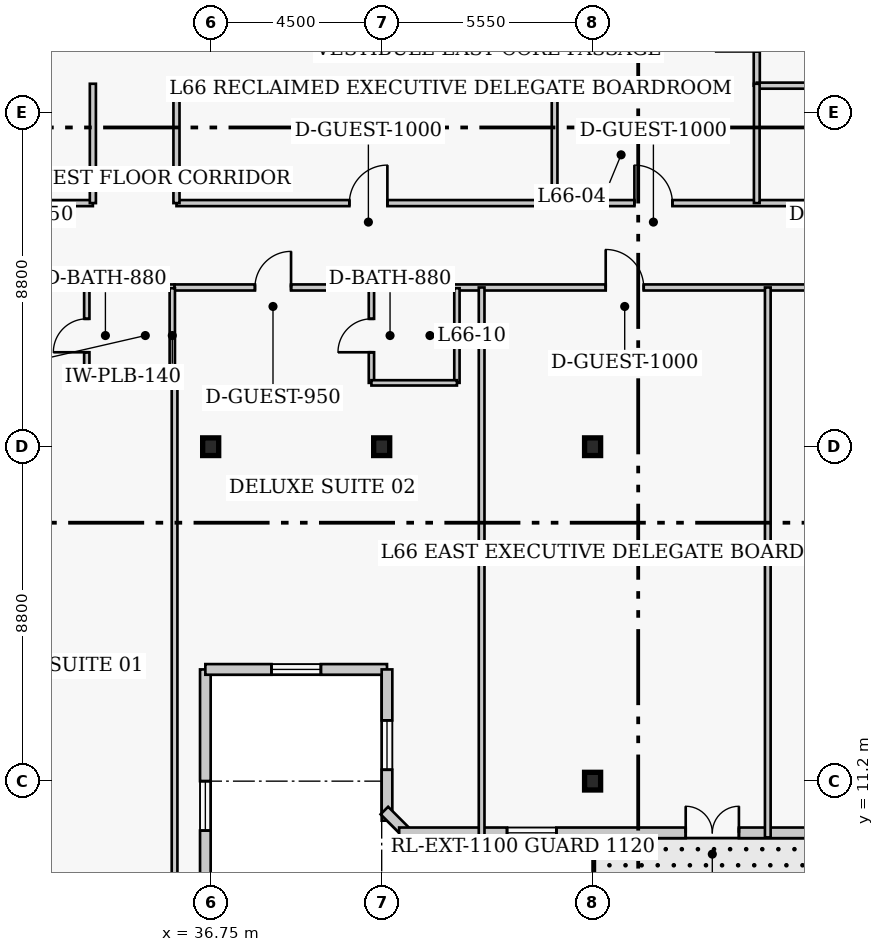
"""IFC4 building model, lengths in metres.
Left out: names, types, materials, properties, quantities, classifications, styles, units other than length and angle.
Written with IfcOpenShell. Run it as: python <this file> out.ifc"""

import sys

from ifc_helpers import new_model, si_unit, direction, frame, frame_2d, origin, origin_2d, place, context, subcontext, project, spatial, rectangle, i_section, extrude, element, fill, save


model = new_model("IFC4")
c1 = context("Model", 3, precision=1e-05, world=origin(), true_north=direction((0.0, 1.0)))
c2 = subcontext(c1, "Body", "Model", "MODEL_VIEW")
j1 = project(units=[si_unit("LENGTHUNIT", "METRE"), si_unit("PLANEANGLEUNIT", "RADIAN")], contexts=[c1])
p1 = place(None, origin())
s1 = spatial("IfcSite", under=j1, at=p1, CompositionType="ELEMENT")
p2 = place(p1, origin())
s2 = spatial("IfcBuilding", under=s1, at=p2, CompositionType="ELEMENT")
p3 = place(p2, frame((0.0, 0.0, 265.4)))
s3 = spatial("IfcBuildingStorey", under=s2, at=p3, CompositionType="ELEMENT", Elevation=265.4)
for number, where, z_axis, x_axis in (
    (1, (36.75, 20.0, 0.0), (0.0, 0.0, 1.0), (1.0, 0.0, 0.0)),
    (2, (41.25, 20.0, 0.0), (0.0, 0.0, 1.0), (1.0, 0.0, 0.0)),
    (3, (46.8, 11.2, 0.0), (0.0, 0.0, 1.0), (1.0, 0.0, 0.0)),
    (4, (46.8, 20.0, 0.0), (0.0, 0.0, 1.0), (1.0, 0.0, 0.0)),
):
    element("IfcColumn", number, at=place(p3, frame(where, z_axis=z_axis, x_axis=x_axis)), inside=s3, PredefinedType="COLUMN", context=c2, shape_type="SweptSolid", body=[
        extrude(i_section(OverallWidth=0.422, OverallDepth=0.465, WebThickness=0.045, FlangeThickness=0.073, FilletRadius=0.017, at=origin_2d()), origin(), (0.0, 0.0, 1.0), 4.0),
    ])
p4 = place(p3, frame((36.61, 6.96, 0.0), z_axis=(0.0, 0.0, 1.0), x_axis=(0.0, 1.0, 0.0)))
e5 = element("IfcWall", 5, at=p4, inside=s3, PredefinedType="SOLIDWALL", context=c2, shape_type="SweptSolid", body=[
    extrude(rectangle(XDim=7.18, YDim=0.28, at=frame_2d((3.59, 0.0))), origin(), (0.0, 0.0, 1.0), 3.76),
])
p5 = place(p4, frame((2.94, 0.0, 0.85)))
e6 = element("IfcOpeningElement", 6, at=p5, cuts=e5, PredefinedType="OPENING", context=c2, shape_type="SweptSolid", body=[
    extrude(rectangle(XDim=1.3, YDim=1.7, at=frame_2d((0.65, 0.85))), frame((0.0, 0.15, 0.0), z_axis=(0.0, -1.0, 0.0), x_axis=(1.0, 0.0, 0.0)), (0.0, 0.0, 1.0), 0.3),
])
p6 = place(p3, frame((36.61, 14.14, 0.0), z_axis=(0.0, 0.0, 1.0), x_axis=(1.0, 0.0, 0.0)))
e7 = element("IfcWall", 7, at=p6, inside=s3, PredefinedType="SOLIDWALL", context=c2, shape_type="SweptSolid", body=[
    extrude(rectangle(XDim=4.78, YDim=0.28, at=frame_2d((2.39, 0.0))), origin(), (0.0, 0.0, 1.0), 3.76),
])
p7 = place(p6, frame((1.74, 0.0, 0.85)))
e8 = element("IfcOpeningElement", 8, at=p7, cuts=e7, PredefinedType="OPENING", context=c2, shape_type="SweptSolid", body=[
    extrude(rectangle(XDim=1.3, YDim=1.7, at=frame_2d((0.65, 0.85))), frame((0.0, 0.15, 0.0), z_axis=(0.0, -1.0, 0.0), x_axis=(1.0, 0.0, 0.0)), (0.0, 0.0, 1.0), 0.3),
])
p8 = place(p3, frame((41.39, 14.14, 0.0), z_axis=(0.0, 0.0, 1.0), x_axis=(0.0, -1.0, 0.0)))
e9 = element("IfcWall", 9, at=p8, inside=s3, PredefinedType="SOLIDWALL", context=c2, shape_type="SweptSolid", body=[
    extrude(rectangle(XDim=3.98, YDim=0.28, at=frame_2d((1.99, 0.0))), origin(), (0.0, 0.0, 1.0), 3.76),
])
p9 = place(p8, frame((1.34, 0.0, 0.85)))
e10 = element("IfcOpeningElement", 10, at=p9, cuts=e9, PredefinedType="OPENING", context=c2, shape_type="SweptSolid", body=[
    extrude(rectangle(XDim=1.3, YDim=1.7, at=frame_2d((0.65, 0.85))), frame((0.0, 0.15, 0.0), z_axis=(0.0, -1.0, 0.0), x_axis=(1.0, 0.0, 0.0)), (0.0, 0.0, 1.0), 0.3),
])
p10 = place(p3, frame((41.321, 10.427, 0.0), z_axis=(0.0, 0.0, 1.0), x_axis=(0.707106781187, -0.707106781187, 0.0)))
e11 = element("IfcWall", 11, at=p10, inside=s3, PredefinedType="SOLIDWALL", context=c2, shape_type="SweptSolid", body=[
    extrude(rectangle(XDim=0.928, YDim=0.28, at=frame_2d((0.464, 0.0))), origin(), (0.0, 0.0, 1.0), 3.76),
])
p11 = place(p3, frame((41.71, 9.84, 0.0), z_axis=(0.0, 0.0, 1.0), x_axis=(1.0, 0.0, 0.0)))
e12 = element("IfcWall", 12, at=p11, inside=s3, PredefinedType="SOLIDWALL", context=c2, shape_type="SweptSolid", body=[
    extrude(rectangle(XDim=24.83, YDim=0.28, at=frame_2d((12.415, 0.0))), origin(), (0.0, 0.0, 1.0), 3.76),
])
p12 = place(p11, frame((7.54, 0.0, 0.0)))
e13 = element("IfcOpeningElement", 13, at=p12, cuts=e12, PredefinedType="OPENING", context=c2, shape_type="SweptSolid", body=[
    extrude(rectangle(XDim=1.4, YDim=2.15, at=frame_2d((0.7, 1.075))), frame((0.0, 0.15, 0.0), z_axis=(0.0, -1.0, 0.0), x_axis=(1.0, 0.0, 0.0)), (0.0, 0.0, 1.0), 0.3),
])
p13 = place(p11, frame((2.838, 0.0, 0.85)))
e14 = element("IfcOpeningElement", 14, at=p13, cuts=e12, PredefinedType="OPENING", context=c2, shape_type="SweptSolid", body=[
    extrude(rectangle(XDim=1.3, YDim=1.7, at=frame_2d((0.65, 0.85))), frame((0.0, 0.15, 0.0), z_axis=(0.0, -1.0, 0.0), x_axis=(1.0, 0.0, 0.0)), (0.0, 0.0, 1.0), 0.3),
])
p14 = place(p11, frame((11.115, 0.0, 0.85)))
e15 = element("IfcOpeningElement", 15, at=p14, cuts=e12, PredefinedType="OPENING", context=c2, shape_type="SweptSolid", body=[
    extrude(rectangle(XDim=1.3, YDim=1.7, at=frame_2d((0.65, 0.85))), frame((0.0, 0.15, 0.0), z_axis=(0.0, -1.0, 0.0), x_axis=(1.0, 0.0, 0.0)), (0.0, 0.0, 1.0), 0.3),
])
p15 = place(p11, frame((18.892, 0.0, 0.85)))
e16 = element("IfcOpeningElement", 16, at=p15, cuts=e12, PredefinedType="OPENING", context=c2, shape_type="SweptSolid", body=[
    extrude(rectangle(XDim=1.3, YDim=1.7, at=frame_2d((0.65, 0.85))), frame((0.0, 0.15, 0.0), z_axis=(0.0, -1.0, 0.0), x_axis=(1.0, 0.0, 0.0)), (0.0, 0.0, 1.0), 0.3),
])
p16 = place(p3, frame((51.12, 29.5, 0.0), z_axis=(0.0, 0.0, 1.0), x_axis=(0.0, 1.0, 0.0)))
e17 = element("IfcWall", 17, at=p16, inside=s3, PredefinedType="PARTITIONING", context=c2, shape_type="SweptSolid", body=[
    extrude(rectangle(XDim=3.7, YDim=0.16, at=frame_2d((1.85, 0.0))), origin(), (0.0, 0.0, 1.0), 3.76),
])
p17 = place(p16, frame((0.9, 0.0, 0.0)))
e18 = element("IfcOpeningElement", 18, at=p17, cuts=e17, PredefinedType="OPENING", context=c2, shape_type="SweptSolid", body=[
    extrude(rectangle(XDim=1.1, YDim=2.15, at=frame_2d((0.55, 1.075))), frame((0.0, 0.09, 0.0), z_axis=(0.0, -1.0, 0.0), x_axis=(1.0, 0.0, 0.0)), (0.0, 0.0, 1.0), 0.18),
])
p18 = place(p3, frame((51.12, 29.5, 0.0), z_axis=(0.0, 0.0, 1.0), x_axis=(1.0, 0.0, 0.0)))
e19 = element("IfcWall", 19, at=p18, inside=s3, PredefinedType="PARTITIONING", context=c2, shape_type="SweptSolid", body=[
    extrude(rectangle(XDim=5.63, YDim=0.16, at=frame_2d((2.815, 0.0))), origin(), (0.0, 0.0, 1.0), 3.76),
])
p19 = place(p3, frame((20.4, 26.41, 0.0), z_axis=(0.0, 0.0, 1.0), x_axis=(1.0, 0.0, 0.0)))
e20 = element("IfcWall", 20, at=p19, inside=s3, PredefinedType="PARTITIONING", context=c2, shape_type="SweptSolid", body=[
    extrude(rectangle(XDim=13.25, YDim=0.16, at=frame_2d((6.625, 0.0))), origin(), (0.0, 0.0, 1.0), 3.76),
])
p20 = place(p19, frame((6.25, 0.0, 0.0)))
e21 = element("IfcOpeningElement", 21, at=p20, cuts=e20, PredefinedType="OPENING", context=c2, shape_type="SweptSolid", body=[
    extrude(rectangle(XDim=1.0, YDim=2.15, at=frame_2d((0.5, 1.075))), frame((0.0, 0.09, 0.0), z_axis=(0.0, -1.0, 0.0), x_axis=(1.0, 0.0, 0.0)), (0.0, 0.0, 1.0), 0.18),
])
p21 = place(p3, frame((35.85, 26.41, 0.0), z_axis=(0.0, 0.0, 1.0), x_axis=(1.0, 0.0, 0.0)))
e22 = element("IfcWall", 22, at=p21, inside=s3, PredefinedType="PARTITIONING", context=c2, shape_type="SweptSolid", body=[
    extrude(rectangle(XDim=22.6, YDim=0.16, at=frame_2d((11.3, 0.0))), origin(), (0.0, 0.0, 1.0), 3.76),
])
p22 = place(p21, frame((4.55, 0.0, 0.0)))
e23 = element("IfcOpeningElement", 23, at=p22, cuts=e22, PredefinedType="OPENING", context=c2, shape_type="SweptSolid", body=[
    extrude(rectangle(XDim=1.0, YDim=2.15, at=frame_2d((0.5, 1.075))), frame((0.0, 0.09, 0.0), z_axis=(0.0, -1.0, 0.0), x_axis=(1.0, 0.0, 0.0)), (0.0, 0.0, 1.0), 0.18),
])
p23 = place(p21, frame((12.05, 0.0, 0.0)))
e24 = element("IfcOpeningElement", 24, at=p23, cuts=e22, PredefinedType="OPENING", context=c2, shape_type="SweptSolid", body=[
    extrude(rectangle(XDim=1.0, YDim=2.15, at=frame_2d((0.5, 1.075))), frame((0.0, 0.09, 0.0), z_axis=(0.0, -1.0, 0.0), x_axis=(1.0, 0.0, 0.0)), (0.0, 0.0, 1.0), 0.18),
])
for number, where, z_axis, x_axis in (
    (25, (33.65, 26.41, 0.0), (0.0, 0.0, 1.0), (0.0, 1.0, 0.0)),
    (26, (35.85, 26.41, 0.0), (0.0, 0.0, 1.0), (0.0, 1.0, 0.0)),
):
    element("IfcWall", number, at=place(p3, frame(where, z_axis=z_axis, x_axis=x_axis)), inside=s3, PredefinedType="PARTITIONING", context=c2, shape_type="SweptSolid", body=[
        extrude(rectangle(XDim=3.14, YDim=0.16, at=frame_2d((1.57, 0.0))), origin(), (0.0, 0.0, 1.0), 3.76),
    ])
p24 = place(p3, frame((20.4, 24.19, 0.0), z_axis=(0.0, 0.0, 1.0), x_axis=(1.0, 0.0, 0.0)))
e27 = element("IfcWall", 27, at=p24, inside=s3, PredefinedType="PARTITIONING", context=c2, shape_type="SweptSolid", body=[
    extrude(rectangle(XDim=15.4, YDim=0.16, at=frame_2d((7.7, 0.0))), origin(), (0.0, 0.0, 1.0), 3.76),
])
p25 = place(p24, frame((3.945, 0.0, 0.0)))
e28 = element("IfcOpeningElement", 28, at=p25, cuts=e27, PredefinedType="OPENING", context=c2, shape_type="SweptSolid", body=[
    extrude(rectangle(XDim=1.0, YDim=2.15, at=frame_2d((0.5, 1.075))), frame((0.0, 0.09, 0.0), z_axis=(0.0, -1.0, 0.0), x_axis=(1.0, 0.0, 0.0)), (0.0, 0.0, 1.0), 0.18),
])
p26 = place(p24, frame((10.485, 0.0, 0.0)))
e29 = element("IfcOpeningElement", 29, at=p26, cuts=e27, PredefinedType="OPENING", context=c2, shape_type="SweptSolid", body=[
    extrude(rectangle(XDim=0.95, YDim=2.1, at=frame_2d((0.475, 1.05))), frame((0.0, 0.09, 0.0), z_axis=(0.0, -1.0, 0.0), x_axis=(1.0, 0.0, 0.0)), (0.0, 0.0, 1.0), 0.18),
])
p27 = place(p3, frame((35.8, 24.19, 0.0), z_axis=(0.0, 0.0, 1.0), x_axis=(1.0, 0.0, 0.0)))
e30 = element("IfcWall", 30, at=p27, inside=s3, PredefinedType="PARTITIONING", context=c2, shape_type="SweptSolid", body=[
    extrude(rectangle(XDim=24.81, YDim=0.16, at=frame_2d((12.405, 0.0))), origin(), (0.0, 0.0, 1.0), 3.76),
])
p28 = place(p27, frame((2.115, 0.0, 0.0)))
e31 = element("IfcOpeningElement", 31, at=p28, cuts=e30, PredefinedType="OPENING", context=c2, shape_type="SweptSolid", body=[
    extrude(rectangle(XDim=0.95, YDim=2.1, at=frame_2d((0.475, 1.05))), frame((0.0, 0.09, 0.0), z_axis=(0.0, -1.0, 0.0), x_axis=(1.0, 0.0, 0.0)), (0.0, 0.0, 1.0), 0.18),
])
p29 = place(p27, frame((11.345, 0.0, 0.0)))
e32 = element("IfcOpeningElement", 32, at=p29, cuts=e30, PredefinedType="OPENING", context=c2, shape_type="SweptSolid", body=[
    extrude(rectangle(XDim=1.0, YDim=2.15, at=frame_2d((0.5, 1.075))), frame((0.0, 0.09, 0.0), z_axis=(0.0, -1.0, 0.0), x_axis=(1.0, 0.0, 0.0)), (0.0, 0.0, 1.0), 0.18),
])
p30 = place(p27, frame((17.47, 0.0, 0.0)))
e33 = element("IfcOpeningElement", 33, at=p30, cuts=e30, PredefinedType="OPENING", context=c2, shape_type="SweptSolid", body=[
    extrude(rectangle(XDim=0.95, YDim=2.1, at=frame_2d((0.475, 1.05))), frame((0.0, 0.09, 0.0), z_axis=(0.0, -1.0, 0.0), x_axis=(1.0, 0.0, 0.0)), (0.0, 0.0, 1.0), 0.18),
])
p31 = place(p27, frame((23.265, 0.0, 0.0)))
e34 = element("IfcOpeningElement", 34, at=p31, cuts=e30, PredefinedType="OPENING", context=c2, shape_type="SweptSolid", body=[
    extrude(rectangle(XDim=0.95, YDim=2.1, at=frame_2d((0.475, 1.05))), frame((0.0, 0.09, 0.0), z_axis=(0.0, -1.0, 0.0), x_axis=(1.0, 0.0, 0.0)), (0.0, 0.0, 1.0), 0.18),
])
for number, where, z_axis, x_axis in (
    (35, (45.8, 26.41, 0.0), (0.0, 0.0, 1.0), (0.0, 1.0, 0.0)),
    (36, (51.12, 26.41, 0.0), (0.0, 0.0, 1.0), (0.0, 1.0, 0.0)),
):
    element("IfcWall", number, at=place(p3, frame(where, z_axis=z_axis, x_axis=x_axis)), inside=s3, PredefinedType="PARTITIONING", context=c2, shape_type="SweptSolid", body=[
        extrude(rectangle(XDim=3.14, YDim=0.15, at=frame_2d((1.57, 0.0))), origin(), (0.0, 0.0, 1.0), 3.76),
    ])
p32 = place(p3, frame((33.49, 21.68, 0.0), z_axis=(0.0, 0.0, 1.0), x_axis=(0.0, 1.0, 0.0)))
e37 = element("IfcWall", 37, at=p32, inside=s3, PredefinedType="PLUMBINGWALL", context=c2, shape_type="SweptSolid", body=[
    extrude(rectangle(XDim=2.49, YDim=0.14, at=frame_2d((1.245, 0.0))), origin(), (0.0, 0.0, 1.0), 3.76),
])
p33 = place(p32, frame((0.805, 0.0, 0.0)))
e38 = element("IfcOpeningElement", 38, at=p33, cuts=e37, PredefinedType="OPENING", context=c2, shape_type="SweptSolid", body=[
    extrude(rectangle(XDim=0.88, YDim=2.05, at=frame_2d((0.44, 1.025))), frame((0.0, 0.08, 0.0), z_axis=(0.0, -1.0, 0.0), x_axis=(1.0, 0.0, 0.0)), (0.0, 0.0, 1.0), 0.16),
])
p34 = place(p3, frame((35.74, 21.68, 0.0), z_axis=(0.0, 0.0, 1.0), x_axis=(0.0, 1.0, 0.0)))
e39 = element("IfcWall", 39, at=p34, inside=s3, PredefinedType="PLUMBINGWALL", context=c2, shape_type="SweptSolid", body=[
    extrude(rectangle(XDim=2.49, YDim=0.14, at=frame_2d((1.245, 0.0))), origin(), (0.0, 0.0, 1.0), 3.76),
])
p35 = place(p3, frame((33.49, 21.68, 0.0), z_axis=(0.0, 0.0, 1.0), x_axis=(1.0, 0.0, 0.0)))
e40 = element("IfcWall", 40, at=p35, inside=s3, PredefinedType="PLUMBINGWALL", context=c2, shape_type="SweptSolid", body=[
    extrude(rectangle(XDim=2.25, YDim=0.14, at=frame_2d((1.125, 0.0))), origin(), (0.0, 0.0, 1.0), 3.76),
])
p36 = place(p3, frame((35.8, 6.52, 0.0), z_axis=(0.0, 0.0, 1.0), x_axis=(0.0, 1.0, 0.0)))
e41 = element("IfcWall", 41, at=p36, inside=s3, PredefinedType="PARTITIONING", context=c2, shape_type="SweptSolid", body=[
    extrude(rectangle(XDim=15.16, YDim=0.15, at=frame_2d((7.58, 0.0))), origin(), (0.0, 0.0, 1.0), 3.76),
])
p37 = place(p3, frame((40.98, 21.68, 0.0), z_axis=(0.0, 0.0, 1.0), x_axis=(0.0, 1.0, 0.0)))
e42 = element("IfcWall", 42, at=p37, inside=s3, PredefinedType="PLUMBINGWALL", context=c2, shape_type="SweptSolid", body=[
    extrude(rectangle(XDim=2.49, YDim=0.14, at=frame_2d((1.245, 0.0))), origin(), (0.0, 0.0, 1.0), 3.76),
])
p38 = place(p37, frame((0.805, 0.0, 0.0)))
e43 = element("IfcOpeningElement", 43, at=p38, cuts=e42, PredefinedType="OPENING", context=c2, shape_type="SweptSolid", body=[
    extrude(rectangle(XDim=0.88, YDim=2.05, at=frame_2d((0.44, 1.025))), frame((0.0, 0.08, 0.0), z_axis=(0.0, -1.0, 0.0), x_axis=(1.0, 0.0, 0.0)), (0.0, 0.0, 1.0), 0.16),
])
p39 = place(p3, frame((43.23, 21.68, 0.0), z_axis=(0.0, 0.0, 1.0), x_axis=(0.0, 1.0, 0.0)))
e44 = element("IfcWall", 44, at=p39, inside=s3, PredefinedType="PLUMBINGWALL", context=c2, shape_type="SweptSolid", body=[
    extrude(rectangle(XDim=2.49, YDim=0.14, at=frame_2d((1.245, 0.0))), origin(), (0.0, 0.0, 1.0), 3.76),
])
p40 = place(p3, frame((40.98, 21.68, 0.0), z_axis=(0.0, 0.0, 1.0), x_axis=(1.0, 0.0, 0.0)))
e45 = element("IfcWall", 45, at=p40, inside=s3, PredefinedType="PLUMBINGWALL", context=c2, shape_type="SweptSolid", body=[
    extrude(rectangle(XDim=2.25, YDim=0.14, at=frame_2d((1.125, 0.0))), origin(), (0.0, 0.0, 1.0), 3.76),
])
for number, where, z_axis, x_axis in (
    (46, (43.88, 9.72, 0.0), (0.0, 0.0, 1.0), (0.0, 1.0, 0.0)),
    (47, (51.41, 9.72, 0.0), (0.0, 0.0, 1.0), (0.0, 1.0, 0.0)),
):
    element("IfcWall", number, at=place(p3, frame(where, z_axis=z_axis, x_axis=x_axis)), inside=s3, PredefinedType="PARTITIONING", context=c2, shape_type="SweptSolid", body=[
        extrude(rectangle(XDim=14.47, YDim=0.15, at=frame_2d((7.235, 0.0))), origin(), (0.0, 0.0, 1.0), 3.76),
    ])
p41 = place(p5, origin())
e48 = element("IfcWindow", 48, at=p41, inside=s3, PartitioningType="SINGLE_PANEL", PredefinedType="WINDOW", context=c2, shape_type="SweptSolid", body=[
    extrude(rectangle(XDim=1.3, YDim=1.7, at=frame_2d((0.65, 0.85))), frame((0.0, 0.03, 0.0), z_axis=(0.0, -1.0, 0.0), x_axis=(1.0, 0.0, 0.0)), (0.0, 0.0, 1.0), 0.06),
])
fill(e6, e48)
p42 = place(p7, origin())
e49 = element("IfcWindow", 49, at=p42, inside=s3, PartitioningType="SINGLE_PANEL", PredefinedType="WINDOW", context=c2, shape_type="SweptSolid", body=[
    extrude(rectangle(XDim=1.3, YDim=1.7, at=frame_2d((0.65, 0.85))), frame((0.0, 0.03, 0.0), z_axis=(0.0, -1.0, 0.0), x_axis=(1.0, 0.0, 0.0)), (0.0, 0.0, 1.0), 0.06),
])
fill(e8, e49)
p43 = place(p9, origin())
e50 = element("IfcWindow", 50, at=p43, inside=s3, PartitioningType="SINGLE_PANEL", PredefinedType="WINDOW", context=c2, shape_type="SweptSolid", body=[
    extrude(rectangle(XDim=1.3, YDim=1.7, at=frame_2d((0.65, 0.85))), frame((0.0, 0.03, 0.0), z_axis=(0.0, -1.0, 0.0), x_axis=(1.0, 0.0, 0.0)), (0.0, 0.0, 1.0), 0.06),
])
fill(e10, e50)
p44 = place(p12, origin())
e51 = element("IfcDoor", 51, at=p44, inside=s3, OperationType="DOUBLE_DOOR_SINGLE_SWING", PredefinedType="DOOR", context=c2, shape_type="SweptSolid", body=[
    extrude(rectangle(XDim=1.4, YDim=2.15, at=frame_2d((0.7, 1.075))), frame((0.0, 0.025, 0.0), z_axis=(0.0, -1.0, 0.0), x_axis=(1.0, 0.0, 0.0)), (0.0, 0.0, 1.0), 0.05),
])
fill(e13, e51)
p45 = place(p13, origin())
e52 = element("IfcWindow", 52, at=p45, inside=s3, PartitioningType="SINGLE_PANEL", PredefinedType="WINDOW", context=c2, shape_type="SweptSolid", body=[
    extrude(rectangle(XDim=1.3, YDim=1.7, at=frame_2d((0.65, 0.85))), frame((0.0, 0.03, 0.0), z_axis=(0.0, -1.0, 0.0), x_axis=(1.0, 0.0, 0.0)), (0.0, 0.0, 1.0), 0.06),
])
fill(e14, e52)
p46 = place(p22, origin())
e53 = element("IfcDoor", 53, at=p46, inside=s3, OperationType="SINGLE_SWING_RIGHT", PredefinedType="DOOR", context=c2, shape_type="SweptSolid", body=[
    extrude(rectangle(XDim=1.0, YDim=2.15, at=frame_2d((0.5, 1.075))), frame((0.0, 0.025, 0.0), z_axis=(0.0, -1.0, 0.0), x_axis=(1.0, 0.0, 0.0)), (0.0, 0.0, 1.0), 0.05),
])
fill(e23, e53)
p47 = place(p23, origin())
e54 = element("IfcDoor", 54, at=p47, inside=s3, OperationType="SINGLE_SWING_LEFT", PredefinedType="DOOR", context=c2, shape_type="SweptSolid", body=[
    extrude(rectangle(XDim=1.0, YDim=2.15, at=frame_2d((0.5, 1.075))), frame((0.0, 0.025, 0.0), z_axis=(0.0, -1.0, 0.0), x_axis=(1.0, 0.0, 0.0)), (0.0, 0.0, 1.0), 0.05),
])
fill(e24, e54)
p48 = place(p33, origin())
e55 = element("IfcDoor", 55, at=p48, inside=s3, OperationType="SINGLE_SWING_LEFT", PredefinedType="DOOR", context=c2, shape_type="SweptSolid", body=[
    extrude(rectangle(XDim=0.88, YDim=2.05, at=frame_2d((0.44, 1.025))), frame((0.0, 0.025, 0.0), z_axis=(0.0, -1.0, 0.0), x_axis=(1.0, 0.0, 0.0)), (0.0, 0.0, 1.0), 0.05),
])
fill(e38, e55)
p49 = place(p38, origin())
e56 = element("IfcDoor", 56, at=p49, inside=s3, OperationType="SINGLE_SWING_LEFT", PredefinedType="DOOR", context=c2, shape_type="SweptSolid", body=[
    extrude(rectangle(XDim=0.88, YDim=2.05, at=frame_2d((0.44, 1.025))), frame((0.0, 0.025, 0.0), z_axis=(0.0, -1.0, 0.0), x_axis=(1.0, 0.0, 0.0)), (0.0, 0.0, 1.0), 0.05),
])
fill(e43, e56)
p50 = place(p28, origin())
e57 = element("IfcDoor", 57, at=p50, inside=s3, OperationType="SINGLE_SWING_RIGHT", PredefinedType="DOOR", context=c2, shape_type="SweptSolid", body=[
    extrude(rectangle(XDim=0.95, YDim=2.1, at=frame_2d((0.475, 1.05))), frame((0.0, 0.025, 0.0), z_axis=(0.0, -1.0, 0.0), x_axis=(1.0, 0.0, 0.0)), (0.0, 0.0, 1.0), 0.05),
])
fill(e31, e57)
p51 = place(p29, origin())
e58 = element("IfcDoor", 58, at=p51, inside=s3, OperationType="SINGLE_SWING_LEFT", PredefinedType="DOOR", context=c2, shape_type="SweptSolid", body=[
    extrude(rectangle(XDim=1.0, YDim=2.15, at=frame_2d((0.5, 1.075))), frame((0.0, 0.025, 0.0), z_axis=(0.0, -1.0, 0.0), x_axis=(1.0, 0.0, 0.0)), (0.0, 0.0, 1.0), 0.05),
])
fill(e32, e58)
save(model, sys.argv[1])
